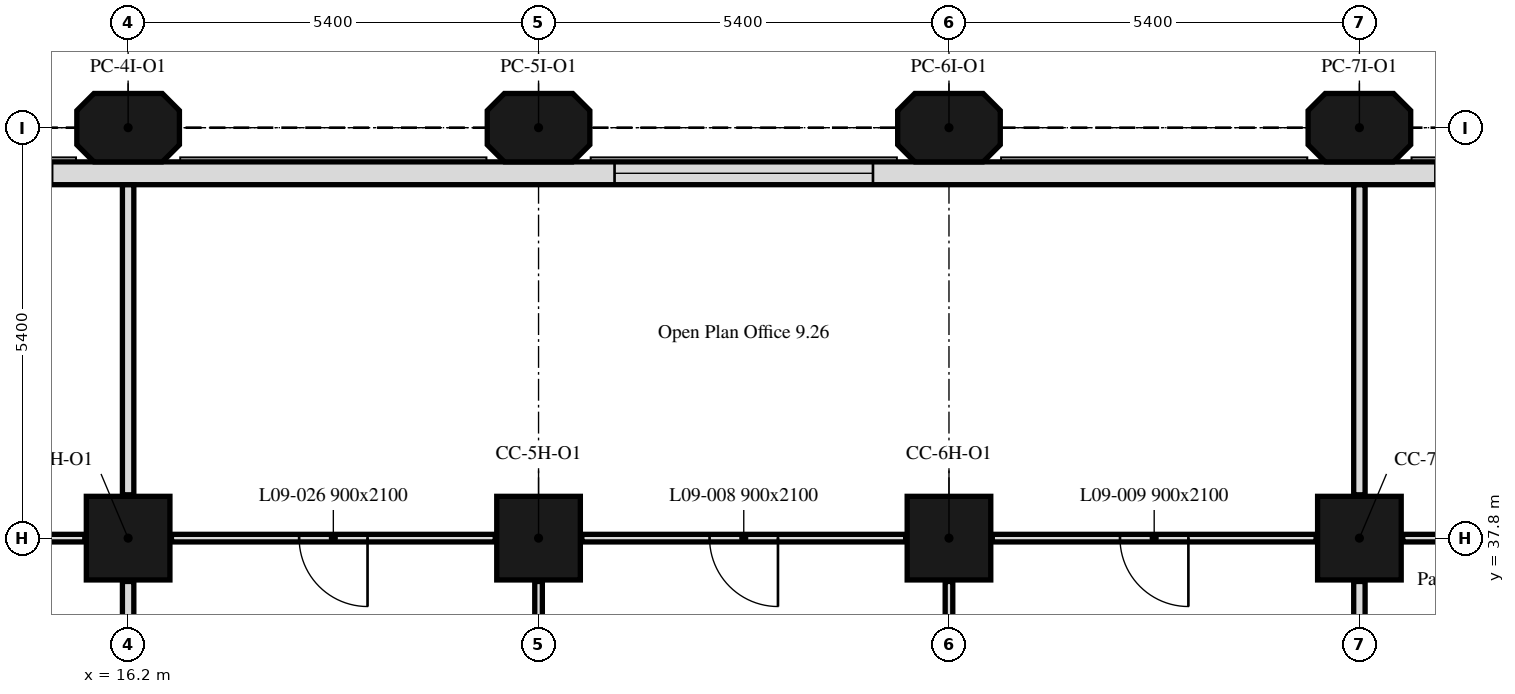
"""IFC4 building model, lengths in metres.
Left out: names, types, materials, properties, quantities, classifications, styles, units other than length and angle.
Written with IfcOpenShell. Run it as: python <this file> out.ifc"""

import sys

from ifc_helpers import new_model, si_unit, direction, frame, frame_2d, origin, origin_2d, place, context, subcontext, project, spatial, polyline, rectangle, outline, extrude, element, fill, save


model = new_model("IFC4")
c1 = context("Model", 3, precision=1e-05, world=origin(), true_north=direction((0.0, 1.0)))
c2 = subcontext(c1, "Body", "Model", "MODEL_VIEW")
j1 = project(units=[si_unit("LENGTHUNIT", "METRE"), si_unit("PLANEANGLEUNIT", "RADIAN")], contexts=[c1])
p1 = place(None, origin())
s1 = spatial("IfcSite", under=j1, at=p1, CompositionType="ELEMENT")
p2 = place(p1, origin())
s2 = spatial("IfcBuilding", under=s1, at=p2, CompositionType="ELEMENT")
p3 = place(p2, frame((0.0, 0.0, 45.0)))
s3 = spatial("IfcBuildingStorey", under=s2, at=p3, CompositionType="ELEMENT", Elevation=45.0)
for number, where, z_axis, x_axis in (
    (1, (16.2, 37.8, 0.0), (0.0, 0.0, 1.0), (1.0, 0.0, 0.0)),
    (2, (21.6, 37.8, 0.0), (0.0, 0.0, 1.0), (1.0, 0.0, 0.0)),
    (3, (27.0, 37.8, 0.0), (0.0, 0.0, 1.0), (1.0, 0.0, 0.0)),
    (4, (32.4, 37.8, 0.0), (0.0, 0.0, 1.0), (1.0, 0.0, 0.0)),
):
    element("IfcColumn", number, at=place(p3, frame(where, z_axis=z_axis, x_axis=x_axis)), inside=s3, PredefinedType="COLUMN", context=c2, shape_type="SweptSolid", body=[
        extrude(rectangle(XDim=1.1, YDim=1.1, at=origin_2d()), origin(), (0.0, 0.0, 1.0), 3.5),
    ])
for number, where, z_axis, x_axis in (
    (5, (16.2, 43.2, 0.0), (0.0, 0.0, 1.0), (1.0, 0.0, 0.0)),
    (6, (21.6, 43.2, 0.0), (0.0, 0.0, 1.0), (1.0, 0.0, 0.0)),
    (7, (27.0, 43.2, 0.0), (0.0, 0.0, 1.0), (1.0, 0.0, 0.0)),
    (8, (32.4, 43.2, 0.0), (0.0, 0.0, 1.0), (1.0, 0.0, 0.0)),
):
    element("IfcColumn", number, at=place(p3, frame(where, z_axis=z_axis, x_axis=x_axis)), inside=s3, PredefinedType="COLUMN", context=c2, shape_type="SweptSolid", body=[
        extrude(outline(polyline([(-0.45, -0.45), (0.45, -0.45), (0.675, -0.225), (0.675, 0.225), (0.45, 0.45), (-0.45, 0.45), (-0.675, 0.225), (-0.675, -0.225), (-0.45, -0.45)])), origin(), (0.0, 0.0, 1.0), 3.5),
    ])
p4 = place(p3, frame((43.014, 42.6, 0.0), z_axis=(0.0, 0.0, 1.0), x_axis=(-1.0, 0.0, 0.0)))
e9 = element("IfcWall", 9, at=p4, inside=s3, PredefinedType="SOLIDWALL", context=c2, shape_type="SweptSolid", body=[
    extrude(rectangle(XDim=32.027, YDim=0.3, at=frame_2d((16.014, 0.0))), origin(), (0.0, 0.0, 1.0), 3.5),
])
p5 = place(p4, frame((6.214, 0.0, 0.9)))
e10 = element("IfcOpeningElement", 10, at=p5, cuts=e9, PredefinedType="OPENING", context=c2, shape_type="SweptSolid", body=[
    extrude(rectangle(XDim=3.4, YDim=1.7, at=frame_2d((1.7, 0.85))), frame((0.0, 0.16, 0.0), z_axis=(0.0, -1.0, 0.0), x_axis=(1.0, 0.0, 0.0)), (0.0, 0.0, 1.0), 0.32),
])
p6 = place(p4, frame((17.014, 0.0, 0.9)))
e11 = element("IfcOpeningElement", 11, at=p6, cuts=e9, PredefinedType="OPENING", context=c2, shape_type="SweptSolid", body=[
    extrude(rectangle(XDim=3.4, YDim=1.7, at=frame_2d((1.7, 0.85))), frame((0.0, 0.16, 0.0), z_axis=(0.0, -1.0, 0.0), x_axis=(1.0, 0.0, 0.0)), (0.0, 0.0, 1.0), 0.32),
])
p7 = place(p4, frame((27.814, 0.0, 0.9)))
e12 = element("IfcOpeningElement", 12, at=p7, cuts=e9, PredefinedType="OPENING", context=c2, shape_type="SweptSolid", body=[
    extrude(rectangle(XDim=3.4, YDim=1.7, at=frame_2d((1.7, 0.85))), frame((0.0, 0.16, 0.0), z_axis=(0.0, -1.0, 0.0), x_axis=(1.0, 0.0, 0.0)), (0.0, 0.0, 1.0), 0.32),
])
p8 = place(p3, frame((16.2, 35.175, 0.0), z_axis=(0.0, 0.0, 1.0), x_axis=(0.0, 1.0, 0.0)))
e13 = element("IfcWall", 13, at=p8, inside=s3, PredefinedType="PARTITIONING", context=c2, shape_type="SweptSolid", body=[
    extrude(rectangle(XDim=2.055, YDim=0.15, at=frame_2d((1.027, 0.0))), origin(), (0.0, 0.0, 1.0), 3.5),
])
p9 = place(p3, frame((15.63, 37.8, 0.0), z_axis=(0.0, 0.0, 1.0), x_axis=(-1.0, 0.0, 0.0)))
e14 = element("IfcWall", 14, at=p9, inside=s3, PredefinedType="PARTITIONING", context=c2, shape_type="SweptSolid", body=[
    extrude(rectangle(XDim=4.26, YDim=0.1, at=frame_2d((2.13, 0.0))), origin(), (0.0, 0.0, 1.0), 3.5),
])
p10 = place(p3, frame((16.2, 38.37, 0.0), z_axis=(0.0, 0.0, 1.0), x_axis=(0.0, 1.0, 0.0)))
e15 = element("IfcWall", 15, at=p10, inside=s3, PredefinedType="PARTITIONING", context=c2, shape_type="SweptSolid", body=[
    extrude(rectangle(XDim=4.079, YDim=0.15, at=frame_2d((2.04, 0.0))), origin(), (0.0, 0.0, 1.0), 3.5),
])
p11 = place(p3, frame((21.6, 35.175, 0.0), z_axis=(0.0, 0.0, 1.0), x_axis=(0.0, 1.0, 0.0)))
e16 = element("IfcWall", 16, at=p11, inside=s3, PredefinedType="PARTITIONING", context=c2, shape_type="SweptSolid", body=[
    extrude(rectangle(XDim=2.055, YDim=0.1, at=frame_2d((1.027, 0.0))), origin(), (0.0, 0.0, 1.0), 3.5),
])
p12 = place(p3, frame((21.03, 37.8, 0.0), z_axis=(0.0, 0.0, 1.0), x_axis=(-1.0, 0.0, 0.0)))
e17 = element("IfcWall", 17, at=p12, inside=s3, PredefinedType="PARTITIONING", context=c2, shape_type="SweptSolid", body=[
    extrude(rectangle(XDim=4.26, YDim=0.1, at=frame_2d((2.13, 0.0))), origin(), (0.0, 0.0, 1.0), 3.5),
])
p13 = place(p12, frame((1.68, 0.0, 0.0)))
e18 = element("IfcOpeningElement", 18, at=p13, cuts=e17, PredefinedType="OPENING", context=c2, shape_type="SweptSolid", body=[
    extrude(rectangle(XDim=0.9, YDim=2.1, at=frame_2d((0.45, 1.05))), frame((0.0, 0.05, 0.0), z_axis=(0.0, -1.0, 0.0), x_axis=(1.0, 0.0, 0.0)), (0.0, 0.0, 1.0), 0.1),
])
p14 = place(p3, frame((27.0, 35.175, 0.0), z_axis=(0.0, 0.0, 1.0), x_axis=(0.0, 1.0, 0.0)))
e19 = element("IfcWall", 19, at=p14, inside=s3, PredefinedType="PARTITIONING", context=c2, shape_type="SweptSolid", body=[
    extrude(rectangle(XDim=2.055, YDim=0.1, at=frame_2d((1.027, 0.0))), origin(), (0.0, 0.0, 1.0), 3.5),
])
p15 = place(p3, frame((26.43, 37.8, 0.0), z_axis=(0.0, 0.0, 1.0), x_axis=(-1.0, 0.0, 0.0)))
e20 = element("IfcWall", 20, at=p15, inside=s3, PredefinedType="PARTITIONING", context=c2, shape_type="SweptSolid", body=[
    extrude(rectangle(XDim=4.26, YDim=0.1, at=frame_2d((2.13, 0.0))), origin(), (0.0, 0.0, 1.0), 3.5),
])
p16 = place(p15, frame((1.68, 0.0, 0.0)))
e21 = element("IfcOpeningElement", 21, at=p16, cuts=e20, PredefinedType="OPENING", context=c2, shape_type="SweptSolid", body=[
    extrude(rectangle(XDim=0.9, YDim=2.1, at=frame_2d((0.45, 1.05))), frame((0.0, 0.05, 0.0), z_axis=(0.0, -1.0, 0.0), x_axis=(1.0, 0.0, 0.0)), (0.0, 0.0, 1.0), 0.1),
])
p17 = place(p3, frame((32.4, 35.175, 0.0), z_axis=(0.0, 0.0, 1.0), x_axis=(0.0, 1.0, 0.0)))
e22 = element("IfcWall", 22, at=p17, inside=s3, PredefinedType="PARTITIONING", context=c2, shape_type="SweptSolid", body=[
    extrude(rectangle(XDim=2.055, YDim=0.15, at=frame_2d((1.027, 0.0))), origin(), (0.0, 0.0, 1.0), 3.5),
])
p18 = place(p3, frame((31.83, 37.8, 0.0), z_axis=(0.0, 0.0, 1.0), x_axis=(-1.0, 0.0, 0.0)))
e23 = element("IfcWall", 23, at=p18, inside=s3, PredefinedType="PARTITIONING", context=c2, shape_type="SweptSolid", body=[
    extrude(rectangle(XDim=4.26, YDim=0.1, at=frame_2d((2.13, 0.0))), origin(), (0.0, 0.0, 1.0), 3.5),
])
p19 = place(p18, frame((1.68, 0.0, 0.0)))
e24 = element("IfcOpeningElement", 24, at=p19, cuts=e23, PredefinedType="OPENING", context=c2, shape_type="SweptSolid", body=[
    extrude(rectangle(XDim=0.9, YDim=2.1, at=frame_2d((0.45, 1.05))), frame((0.0, 0.05, 0.0), z_axis=(0.0, -1.0, 0.0), x_axis=(1.0, 0.0, 0.0)), (0.0, 0.0, 1.0), 0.1),
])
p20 = place(p3, frame((32.4, 38.37, 0.0), z_axis=(0.0, 0.0, 1.0), x_axis=(0.0, 1.0, 0.0)))
e25 = element("IfcWall", 25, at=p20, inside=s3, PredefinedType="PARTITIONING", context=c2, shape_type="SweptSolid", body=[
    extrude(rectangle(XDim=4.079, YDim=0.15, at=frame_2d((2.04, 0.0))), origin(), (0.0, 0.0, 1.0), 3.5),
])
p21 = place(p3, frame((37.23, 37.8, 0.0), z_axis=(0.0, 0.0, 1.0), x_axis=(-1.0, 0.0, 0.0)))
e26 = element("IfcWall", 26, at=p21, inside=s3, PredefinedType="PARTITIONING", context=c2, shape_type="SweptSolid", body=[
    extrude(rectangle(XDim=4.26, YDim=0.1, at=frame_2d((2.13, 0.0))), origin(), (0.0, 0.0, 1.0), 3.5),
])
p22 = place(p21, frame((1.06, 0.0, 0.0)))
e27 = element("IfcOpeningElement", 27, at=p22, cuts=e26, PredefinedType="OPENING", context=c2, shape_type="SweptSolid", body=[
    extrude(rectangle(XDim=0.9, YDim=2.1, at=frame_2d((0.45, 1.05))), frame((0.0, 0.05, 0.0), z_axis=(0.0, -1.0, 0.0), x_axis=(1.0, 0.0, 0.0)), (0.0, 0.0, 1.0), 0.1),
])
p23 = place(p6, origin())
e28 = element("IfcWindow", 28, at=p23, inside=s3, PartitioningType="SINGLE_PANEL", PredefinedType="WINDOW", context=c2, shape_type="SweptSolid", body=[
    extrude(rectangle(XDim=3.4, YDim=1.7, at=frame_2d((1.7, 0.85))), frame((0.0, 0.03, 0.0), z_axis=(0.0, -1.0, 0.0), x_axis=(1.0, 0.0, 0.0)), (0.0, 0.0, 1.0), 0.06),
])
fill(e11, e28)
p24 = place(p16, origin())
e29 = element("IfcDoor", 29, at=p24, inside=s3, OperationType="SINGLE_SWING_LEFT", PredefinedType="DOOR", context=c2, shape_type="SweptSolid", body=[
    extrude(rectangle(XDim=0.9, YDim=2.1, at=frame_2d((0.45, 1.05))), frame((0.0, 0.025, 0.0), z_axis=(0.0, -1.0, 0.0), x_axis=(1.0, 0.0, 0.0)), (0.0, 0.0, 1.0), 0.05),
])
fill(e21, e29)
p25 = place(p19, origin())
e30 = element("IfcDoor", 30, at=p25, inside=s3, OperationType="SINGLE_SWING_LEFT", PredefinedType="DOOR", context=c2, shape_type="SweptSolid", body=[
    extrude(rectangle(XDim=0.9, YDim=2.1, at=frame_2d((0.45, 1.05))), frame((0.0, 0.025, 0.0), z_axis=(0.0, -1.0, 0.0), x_axis=(1.0, 0.0, 0.0)), (0.0, 0.0, 1.0), 0.05),
])
fill(e24, e30)
p26 = place(p13, origin())
e31 = element("IfcDoor", 31, at=p26, inside=s3, OperationType="SINGLE_SWING_RIGHT", PredefinedType="DOOR", context=c2, shape_type="SweptSolid", body=[
    extrude(rectangle(XDim=0.9, YDim=2.1, at=frame_2d((0.45, 1.05))), frame((0.0, 0.025, 0.0), z_axis=(0.0, -1.0, 0.0), x_axis=(1.0, 0.0, 0.0)), (0.0, 0.0, 1.0), 0.05),
])
fill(e18, e31)
save(model, sys.argv[1])
